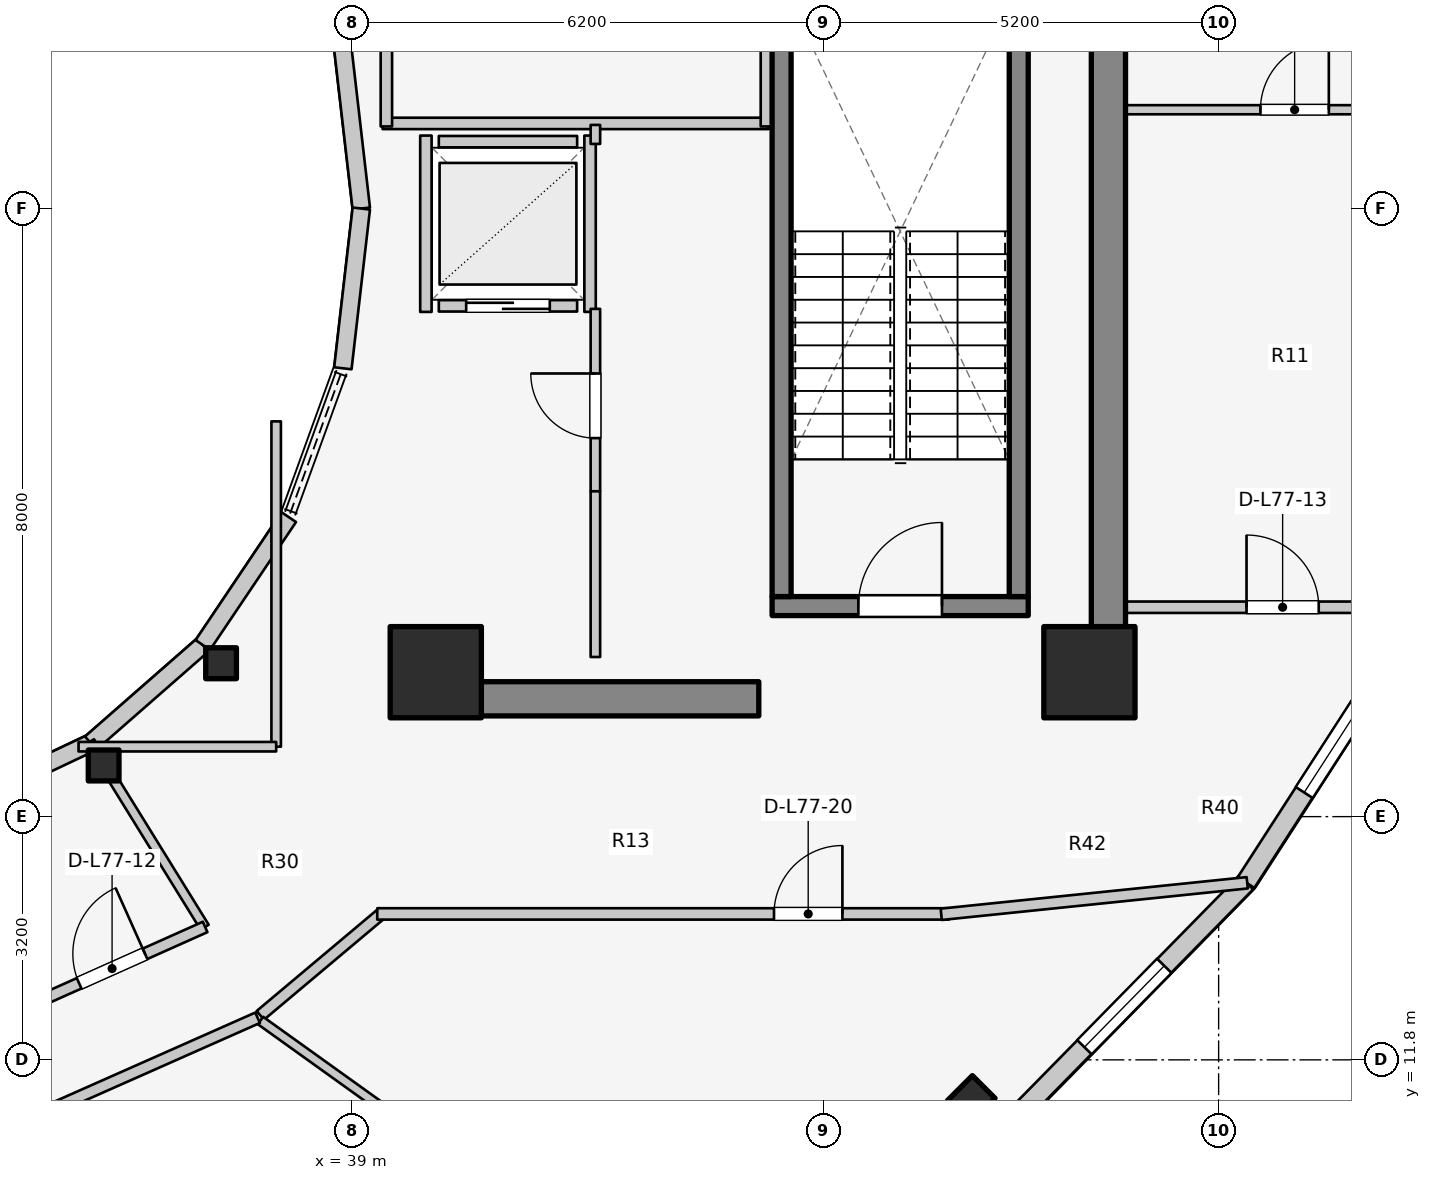
"""IFC4 building model, lengths in metres.
Left out: names, types, materials, properties, quantities, classifications, styles, units other than length and angle.
Written with IfcOpenShell. Run it as: python <this file> out.ifc"""

import sys

from ifc_helpers import new_model, si_unit, direction, frame, frame_2d, origin, origin_2d, place, context, subcontext, project, spatial, rectangle, i_section, extrude, element, fill, save


model = new_model("IFC4")
c1 = context("Model", 3, precision=1e-05, world=origin(), true_north=direction((0.0, 1.0)))
c2 = subcontext(c1, "Body", "Model", "MODEL_VIEW")
j1 = project(units=[si_unit("LENGTHUNIT", "METRE"), si_unit("PLANEANGLEUNIT", "RADIAN")], contexts=[c1])
p1 = place(None, origin())
s1 = spatial("IfcSite", under=j1, at=p1, CompositionType="ELEMENT")
p2 = place(p1, origin())
s2 = spatial("IfcBuilding", under=s1, at=p2, CompositionType="ELEMENT")
p3 = place(p2, frame((0.0, 0.0, 253.2)))
s3 = spatial("IfcBuildingStorey", under=s2, at=p3, CompositionType="ELEMENT", Elevation=253.2)
p4 = place(p3, frame((48.95, 17.05, 0.0), z_axis=(0.0, 0.0, 1.0), x_axis=(0.0, 1.0, 0.0)))
e1 = element("IfcWall", 1, at=p4, inside=s3, PredefinedType="SHEAR", context=c2, shape_type="SweptSolid", body=[
    extrude(rectangle(XDim=12.8, YDim=0.45, at=frame_2d((6.4, 0.0))), origin(), (0.0, 0.0, 1.0), 3.6),
])
p5 = place(p3, frame((39.85, 16.55, 0.0), z_axis=(0.0, 0.0, 1.0), x_axis=(1.0, 0.0, 0.0)))
e2 = element("IfcWall", 2, at=p5, inside=s3, PredefinedType="SHEAR", context=c2, shape_type="SweptSolid", body=[
    extrude(rectangle(XDim=4.5, YDim=0.45, at=frame_2d((2.25, 0.0))), origin(), (0.0, 0.0, 1.0), 3.6),
])
p6 = place(p3, frame((44.525, 17.77, 0.0), z_axis=(0.0, 0.0, 1.0), x_axis=(1.0, 0.0, 0.0)))
e3 = element("IfcWall", 3, at=p6, inside=s3, PredefinedType="SOLIDWALL", context=c2, shape_type="SweptSolid", body=[
    extrude(rectangle(XDim=3.37, YDim=0.25, at=frame_2d((1.685, 0.0))), origin(), (0.0, 0.0, 1.0), 3.6),
])
p7 = place(p6, frame((1.135, 0.0, 0.0)))
e4 = element("IfcOpeningElement", 4, at=p7, cuts=e3, PredefinedType="OPENING", context=c2, shape_type="SweptSolid", body=[
    extrude(rectangle(XDim=1.1, YDim=2.1, at=frame_2d((0.55, 1.05))), frame((0.0, 0.135, 0.0), z_axis=(0.0, -1.0, 0.0), x_axis=(1.0, 0.0, 0.0)), (0.0, 0.0, 1.0), 0.27),
])
for number, where, z_axis, x_axis in (
    (5, (44.65, 17.895, 0.0), (0.0, 0.0, 1.0), (0.0, 1.0, 0.0)),
    (6, (47.77, 17.895, 0.0), (0.0, 0.0, 1.0), (0.0, 1.0, 0.0)),
):
    element("IfcWall", number, at=place(p3, frame(where, z_axis=z_axis, x_axis=x_axis)), inside=s3, PredefinedType="SOLIDWALL", context=c2, shape_type="SweptSolid", body=[
        extrude(rectangle(XDim=7.81, YDim=0.25, at=frame_2d((3.905, 0.0))), origin(), (0.0, 0.0, 1.0), 3.6),
    ])
for number, where, z_axis, x_axis in (
    (7, (40.1, 16.9, 0.0), (0.0, 0.0, 1.0), (1.0, 0.0, 0.0)),
    (8, (48.7, 16.9, 0.0), (0.0, 0.0, 1.0), (1.0, 0.0, 0.0)),
):
    element("IfcColumn", number, at=place(p3, frame(where, z_axis=z_axis, x_axis=x_axis)), inside=s3, PredefinedType="COLUMN", context=c2, shape_type="SweptSolid", body=[
        extrude(rectangle(XDim=1.2, YDim=1.2, at=origin_2d()), origin(), (0.0, 0.0, 1.0), 3.6),
    ])
for number, where, z_axis, x_axis in (
    (9, (35.73, 15.673, 0.0), (0.0, 0.0, 1.0), (1.0, 0.0, 0.0)),
    (10, (37.275, 17.018, 0.0), (0.0, 0.0, 1.0), (1.0, 0.0, 0.0)),
):
    element("IfcColumn", number, at=place(p3, frame(where, z_axis=z_axis, x_axis=x_axis)), inside=s3, PredefinedType="COLUMN", context=c2, shape_type="SweptSolid", body=[
        extrude(i_section(OverallWidth=0.404, OverallDepth=0.407, WebThickness=0.027, FlangeThickness=0.044, FilletRadius=0.025, at=origin_2d()), origin(), (0.0, 0.0, 1.0), 3.6),
    ])
p8 = place(p3, frame((47.145, 11.279, 0.0), z_axis=(0.0, 0.0, 1.0), x_axis=(0.707106781187, -0.707106781187, 0.0)))
e11 = element("IfcColumn", 11, at=p8, inside=s3, PredefinedType="COLUMN", context=c2, shape_type="SweptSolid", body=[
    extrude(i_section(OverallWidth=0.422, OverallDepth=0.465, WebThickness=0.045, FlangeThickness=0.073, FilletRadius=0.025, at=origin_2d()), origin(), (0.0, 0.0, 1.0), 3.6),
])
p9 = place(p3, frame((39.12, 23.0, 0.0), z_axis=(0.0, 0.0, 1.0), x_axis=(-0.114711713601, 0.993398823617, 0.0)))
e12 = element("IfcWall", 12, at=p9, inside=s3, PredefinedType="STANDARD", context=c2, shape_type="SweptSolid", body=[
    extrude(rectangle(XDim=2.115, YDim=0.23, at=frame_2d((1.058, 0.0))), origin(), (0.0, 0.0, 1.0), 3.28),
])
p10 = place(p3, frame((33.843, 15.157, 0.0), z_axis=(0.0, 0.0, 1.0), x_axis=(0.904179699603, 0.427152280606, 0.0)))
e13 = element("IfcWall", 13, at=p10, inside=s3, PredefinedType="STANDARD", context=c2, shape_type="SweptSolid", body=[
    extrude(rectangle(XDim=1.899, YDim=0.23, at=frame_2d((0.95, 0.0))), origin(), (0.0, 0.0, 1.0), 2.6),
])
p11 = place(p3, frame((35.56, 15.968, 0.0), z_axis=(0.0, 0.0, 1.0), x_axis=(0.752576694707, 0.658504607869, 0.0)))
e14 = element("IfcWall", 14, at=p11, inside=s3, PredefinedType="STANDARD", context=c2, shape_type="SweptSolid", body=[
    extrude(rectangle(XDim=1.959, YDim=0.23, at=frame_2d((0.98, 0.0))), origin(), (0.0, 0.0, 1.0), 2.6),
])
p12 = place(p3, frame((37.035, 17.258, 0.0), z_axis=(0.0, 0.0, 1.0), x_axis=(0.558197800898, 0.829707909492, 0.0)))
e15 = element("IfcWall", 15, at=p12, inside=s3, PredefinedType="STANDARD", context=c2, shape_type="SweptSolid", body=[
    extrude(rectangle(XDim=2.027, YDim=0.23, at=frame_2d((1.013, 0.0))), origin(), (0.0, 0.0, 1.0), 2.6),
])
p13 = place(p3, frame((38.877, 20.898, 0.0), z_axis=(0.0, 0.0, 1.0), x_axis=(0.114711713601, 0.993398823617, 0.0)))
e16 = element("IfcWall", 16, at=p13, inside=s3, PredefinedType="STANDARD", context=c2, shape_type="SweptSolid", body=[
    extrude(rectangle(XDim=2.115, YDim=0.23, at=frame_2d((1.058, 0.0))), origin(), (0.0, 0.0, 1.0), 3.28),
])
p14 = place(p3, frame((47.558, 10.871, 0.0), z_axis=(0.0, 0.0, 1.0), x_axis=(0.700642973333, 0.713512034881, 0.0)))
e17 = element("IfcWall", 17, at=p14, inside=s3, PredefinedType="STANDARD", context=c2, shape_type="SweptSolid", body=[
    extrude(rectangle(XDim=4.572, YDim=0.26, at=frame_2d((2.286, 0.0))), origin(), (0.0, 0.0, 1.0), 3.29),
])
p15 = place(p14, frame((1.536, 0.0, 0.75)))
e18 = element("IfcOpeningElement", 18, at=p15, cuts=e17, PredefinedType="OPENING", context=c2, shape_type="SweptSolid", body=[
    extrude(rectangle(XDim=1.5, YDim=1.6, at=frame_2d((0.75, 0.8))), frame((0.0, 0.14, 0.0), z_axis=(0.0, -1.0, 0.0), x_axis=(1.0, 0.0, 0.0)), (0.0, 0.0, 1.0), 0.28),
])
p16 = place(p3, frame((50.761, 14.133, 0.0), z_axis=(0.0, 0.0, 1.0), x_axis=(0.542641766008, 0.839964233634, 0.0)))
e19 = element("IfcWall", 19, at=p16, inside=s3, PredefinedType="STANDARD", context=c2, shape_type="SweptSolid", body=[
    extrude(rectangle(XDim=4.319, YDim=0.26, at=frame_2d((2.16, 0.0))), origin(), (0.0, 0.0, 1.0), 3.29),
])
p17 = place(p16, frame((1.41, 0.0, 0.75)))
e20 = element("IfcOpeningElement", 20, at=p17, cuts=e19, PredefinedType="OPENING", context=c2, shape_type="SweptSolid", body=[
    extrude(rectangle(XDim=1.5, YDim=1.6, at=frame_2d((0.75, 0.8))), frame((0.0, 0.14, 0.0), z_axis=(0.0, -1.0, 0.0), x_axis=(1.0, 0.0, 0.0)), (0.0, 0.0, 1.0), 0.28),
])
p18 = place(p3, frame((40.14, 21.72, 0.0), z_axis=(0.0, 0.0, 1.0), x_axis=(1.0, 0.0, 0.0)))
e21 = element("IfcWall", 21, at=p18, inside=s3, PredefinedType="SOLIDWALL", context=c2, shape_type="SweptSolid", body=[
    extrude(rectangle(XDim=1.82, YDim=0.15, at=frame_2d((0.91, 0.0))), origin(), (0.0, 0.0, 1.0), 2.62),
])
p19 = place(p18, frame((0.36, 0.0, 0.0)))
e22 = element("IfcOpeningElement", 22, at=p19, cuts=e21, PredefinedType="OPENING", context=c2, shape_type="SweptSolid", body=[
    extrude(rectangle(XDim=1.1, YDim=2.1, at=frame_2d((0.55, 1.05))), frame((0.0, 0.085, 0.0), z_axis=(0.0, -1.0, 0.0), x_axis=(1.0, 0.0, 0.0)), (0.0, 0.0, 1.0), 0.17),
])
p20 = place(p3, frame((40.14, 23.88, 0.0), z_axis=(0.0, 0.0, 1.0), x_axis=(1.0, 0.0, 0.0)))
e23 = element("IfcWall", 23, at=p20, inside=s3, PredefinedType="SOLIDWALL", context=c2, shape_type="SweptSolid", body=[
    extrude(rectangle(XDim=1.82, YDim=0.15, at=frame_2d((0.91, 0.0))), origin(), (0.0, 0.0, 1.0), 2.62),
])
p21 = place(p3, frame((39.97, 21.64, 0.0), z_axis=(0.0, 0.0, 1.0), x_axis=(0.0, 1.0, 0.0)))
e24 = element("IfcWall", 24, at=p21, inside=s3, PredefinedType="SOLIDWALL", context=c2, shape_type="SweptSolid", body=[
    extrude(rectangle(XDim=2.32, YDim=0.15, at=frame_2d((1.16, 0.0))), origin(), (0.0, 0.0, 1.0), 2.62),
])
p22 = place(p3, frame((42.13, 21.64, 0.0), z_axis=(0.0, 0.0, 1.0), x_axis=(0.0, 1.0, 0.0)))
e25 = element("IfcWall", 25, at=p22, inside=s3, PredefinedType="SOLIDWALL", context=c2, shape_type="SweptSolid", body=[
    extrude(rectangle(XDim=2.32, YDim=0.15, at=frame_2d((1.16, 0.0))), origin(), (0.0, 0.0, 1.0), 3.295),
])
p23 = place(p3, frame((39.4, 24.12, 0.0), z_axis=(0.0, 0.0, 1.0), x_axis=(1.0, 0.0, 0.0)))
e26 = element("IfcWall", 26, at=p23, inside=s3, PredefinedType="PARTITIONING", context=c2, shape_type="SweptSolid", body=[
    extrude(rectangle(XDim=5.08, YDim=0.15, at=frame_2d((2.54, 0.0))), origin(), (0.0, 0.0, 1.0), 2.62),
])
p24 = place(p3, frame((44.45, 24.08, 0.0), z_axis=(0.0, 0.0, 1.0), x_axis=(0.0, 1.0, 0.0)))
e27 = element("IfcWall", 27, at=p24, inside=s3, PredefinedType="PARTITIONING", context=c2, shape_type="SweptSolid", body=[
    extrude(rectangle(XDim=3.2, YDim=0.15, at=frame_2d((1.6, 0.0))), origin(), (0.0, 0.0, 1.0), 3.295),
])
p25 = place(p3, frame((39.45, 24.08, 0.0), z_axis=(0.0, 0.0, 1.0), x_axis=(0.0, 1.0, 0.0)))
e28 = element("IfcWall", 28, at=p25, inside=s3, PredefinedType="PARTITIONING", context=c2, shape_type="SweptSolid", body=[
    extrude(rectangle(XDim=3.4, YDim=0.15, at=frame_2d((1.7, 0.0))), origin(), (0.0, 0.0, 1.0), 3.295),
])
p26 = place(p25, frame((2.02, 0.0, 0.0)))
e29 = element("IfcOpeningElement", 29, at=p26, cuts=e28, PredefinedType="OPENING", context=c2, shape_type="SweptSolid", body=[
    extrude(rectangle(XDim=1.1, YDim=2.1, at=frame_2d((0.55, 1.05))), frame((0.0, 0.085, 0.0), z_axis=(0.0, -1.0, 0.0), x_axis=(1.0, 0.0, 0.0)), (0.0, 0.0, 1.0), 0.17),
])
p27 = place(p3, frame((42.2, 19.28, 0.0), z_axis=(0.0, 0.0, 1.0), x_axis=(0.0, 1.0, 0.0)))
e30 = element("IfcWall", 30, at=p27, inside=s3, PredefinedType="PARTITIONING", context=c2, shape_type="SweptSolid", body=[
    extrude(rectangle(XDim=2.4, YDim=0.125, at=frame_2d((1.2, 0.0))), origin(), (0.0, 0.0, 1.0), 3.295),
])
p28 = place(p27, frame((0.7, 0.0, 0.0)))
e31 = element("IfcOpeningElement", 31, at=p28, cuts=e30, PredefinedType="OPENING", context=c2, shape_type="SweptSolid", body=[
    extrude(rectangle(XDim=0.85, YDim=2.05, at=frame_2d((0.425, 1.025))), frame((0.0, 0.073, 0.0), z_axis=(0.0, -1.0, 0.0), x_axis=(1.0, 0.0, 0.0)), (0.0, 0.0, 1.0), 0.145),
])
p29 = place(p3, frame((42.2, 23.85, 0.0), z_axis=(0.0, 0.0, 1.0), x_axis=(0.0, 1.0, 0.0)))
e32 = element("IfcWall", 32, at=p29, inside=s3, PredefinedType="PARTITIONING", context=c2, shape_type="SweptSolid", body=[
    extrude(rectangle(XDim=0.25, YDim=0.125, at=frame_2d((0.125, 0.0))), origin(), (0.0, 0.0, 1.0), 3.295),
])
p30 = place(p3, frame((42.2, 17.1, 0.0), z_axis=(0.0, 0.0, 1.0), x_axis=(0.0, 1.0, 0.0)))
e33 = element("IfcWall", 33, at=p30, inside=s3, PredefinedType="PARTITIONING", context=c2, shape_type="SweptSolid", body=[
    extrude(rectangle(XDim=2.18, YDim=0.125, at=frame_2d((1.09, 0.0))), origin(), (0.0, 0.0, 1.0), 3.295),
])
p31 = place(p3, frame((35.55, 15.985, 0.0), z_axis=(0.0, 0.0, 1.0), x_axis=(0.52592395012, -0.850531597702, 0.0)))
e34 = element("IfcWall", 34, at=p31, inside=s3, PredefinedType="PARTITIONING", context=c2, shape_type="SweptSolid", body=[
    extrude(rectangle(XDim=2.869, YDim=0.125, at=frame_2d((1.435, 0.0))), origin(), (0.0, 0.0, 1.0), 2.672),
])
p32 = place(p3, frame((34.617, 12.454, 0.0), z_axis=(0.0, 0.0, 1.0), x_axis=(0.912859324183, 0.408274239027, 0.0)))
e35 = element("IfcWall", 35, at=p32, inside=s3, PredefinedType="PARTITIONING", context=c2, shape_type="SweptSolid", body=[
    extrude(rectangle(XDim=2.682, YDim=0.15, at=frame_2d((1.341, 0.0))), origin(), (0.0, 0.0, 1.0), 2.816),
])
p33 = place(p32, frame((0.866, 0.0, 0.0)))
e36 = element("IfcOpeningElement", 36, at=p33, cuts=e35, PredefinedType="OPENING", context=c2, shape_type="SweptSolid", body=[
    extrude(rectangle(XDim=0.95, YDim=2.1, at=frame_2d((0.475, 1.05))), frame((0.0, 0.085, 0.0), z_axis=(0.0, -1.0, 0.0), x_axis=(1.0, 0.0, 0.0)), (0.0, 0.0, 1.0), 0.17),
])
p34 = place(p3, frame((38.0, 15.92, 0.0), z_axis=(0.0, 0.0, 1.0), x_axis=(0.0, 1.0, 0.0)))
e37 = element("IfcWall", 37, at=p34, inside=s3, PredefinedType="PARTITIONING", context=c2, shape_type="SweptSolid", body=[
    extrude(rectangle(XDim=4.28, YDim=0.125, at=frame_2d((2.14, 0.0))), origin(), (0.0, 0.0, 1.0), 2.672),
])
p35 = place(p3, frame((35.4, 15.92, 0.0), z_axis=(0.0, 0.0, 1.0), x_axis=(1.0, 0.0, 0.0)))
e38 = element("IfcWall", 38, at=p35, inside=s3, PredefinedType="PARTITIONING", context=c2, shape_type="SweptSolid", body=[
    extrude(rectangle(XDim=2.6, YDim=0.125, at=frame_2d((1.3, 0.0))), origin(), (0.0, 0.0, 1.0), 2.672),
])
p36 = place(p3, frame((48.95, 17.755, 0.0), z_axis=(0.0, 0.0, 1.0), x_axis=(1.0, 0.0, 0.0)))
e39 = element("IfcWall", 39, at=p36, inside=s3, PredefinedType="PARTITIONING", context=c2, shape_type="SweptSolid", body=[
    extrude(rectangle(XDim=4.175, YDim=0.15, at=frame_2d((2.087, 0.0))), origin(), (0.0, 0.0, 1.0), 3.295),
])
p37 = place(p36, frame((1.817, 0.0, 0.0)))
e40 = element("IfcOpeningElement", 40, at=p37, cuts=e39, PredefinedType="OPENING", context=c2, shape_type="SweptSolid", body=[
    extrude(rectangle(XDim=0.95, YDim=2.1, at=frame_2d((0.475, 1.05))), frame((0.0, 0.085, 0.0), z_axis=(0.0, -1.0, 0.0), x_axis=(1.0, 0.0, 0.0)), (0.0, 0.0, 1.0), 0.17),
])
p38 = place(p3, frame((48.95, 24.3, 0.0), z_axis=(0.0, 0.0, 1.0), x_axis=(1.0, 0.0, 0.0)))
e41 = element("IfcWall", 41, at=p38, inside=s3, PredefinedType="MOVABLE", context=c2, shape_type="SweptSolid", body=[
    extrude(rectangle(XDim=4.683, YDim=0.12, at=frame_2d((2.341, 0.0))), origin(), (0.0, 0.0, 1.0), 3.295),
])
p39 = place(p38, frame((2.0, 0.0, 0.0)))
e42 = element("IfcOpeningElement", 42, at=p39, cuts=e41, PredefinedType="OPENING", context=c2, shape_type="SweptSolid", body=[
    extrude(rectangle(XDim=0.9, YDim=2.1, at=frame_2d((0.45, 1.05))), frame((0.0, 0.07, 0.0), z_axis=(0.0, -1.0, 0.0), x_axis=(1.0, 0.0, 0.0)), (0.0, 0.0, 1.0), 0.14),
])
p40 = place(p3, frame((37.791, 12.385, 0.0), z_axis=(0.0, 0.0, 1.0), x_axis=(0.765677451641, 0.643224719711, 0.0)))
e43 = element("IfcWall", 43, at=p40, inside=s3, PredefinedType="PARTITIONING", context=c2, shape_type="SweptSolid", body=[
    extrude(rectangle(XDim=2.105, YDim=0.15, at=frame_2d((1.053, 0.0))), origin(), (0.0, 0.0, 1.0), 2.816),
])
p41 = place(p3, frame((39.33, 13.72, 0.0), z_axis=(0.0, 0.0, 1.0), x_axis=(1.0, 0.0, 0.0)))
e44 = element("IfcWall", 44, at=p41, inside=s3, PredefinedType="PARTITIONING", context=c2, shape_type="SweptSolid", body=[
    extrude(rectangle(XDim=7.52, YDim=0.15, at=frame_2d((3.76, 0.0))), origin(), (0.0, 0.0, 1.0), 2.816),
])
p42 = place(p41, frame((5.22, 0.0, 0.0)))
e45 = element("IfcOpeningElement", 45, at=p42, cuts=e44, PredefinedType="OPENING", context=c2, shape_type="SweptSolid", body=[
    extrude(rectangle(XDim=0.9, YDim=2.1, at=frame_2d((0.45, 1.05))), frame((0.0, 0.085, 0.0), z_axis=(0.0, -1.0, 0.0), x_axis=(1.0, 0.0, 0.0)), (0.0, 0.0, 1.0), 0.17),
])
p43 = place(p3, frame((46.75, 13.715, 0.0), z_axis=(0.0, 0.0, 1.0), x_axis=(0.994734711466, 0.102483431859, 0.0)))
e46 = element("IfcWall", 46, at=p43, inside=s3, PredefinedType="PARTITIONING", context=c2, shape_type="SweptSolid", body=[
    extrude(rectangle(XDim=4.047, YDim=0.15, at=frame_2d((2.024, 0.0))), origin(), (0.0, 0.0, 1.0), 2.66),
])
p44 = place(p3, frame((37.794, 12.318, 0.0), z_axis=(0.0, 0.0, 1.0), x_axis=(0.812763742602, -0.582593424879, 0.0)))
e47 = element("IfcWall", 47, at=p44, inside=s3, PredefinedType="MOVABLE", context=c2, shape_type="SweptSolid", body=[
    extrude(rectangle(XDim=6.966, YDim=0.12, at=frame_2d((3.483, 0.0))), origin(), (0.0, 0.0, 1.0), 2.66),
])
p45 = place(p3, frame((34.974, 11.121, 0.0), z_axis=(0.0, 0.0, 1.0), x_axis=(0.914181699255, 0.405304602425, 0.0)))
e48 = element("IfcWall", 48, at=p45, inside=s3, PredefinedType="PARTITIONING", context=c2, shape_type="SweptSolid", body=[
    extrude(rectangle(XDim=3.043, YDim=0.15, at=frame_2d((1.521, 0.0))), origin(), (0.0, 0.0, 1.0), 2.816),
])
p46 = place(p15, origin())
e49 = element("IfcWindow", 49, at=p46, inside=s3, PartitioningType="SINGLE_PANEL", PredefinedType="WINDOW", context=c2, shape_type="SweptSolid", body=[
    extrude(rectangle(XDim=1.5, YDim=1.6, at=frame_2d((0.75, 0.8))), frame((0.0, 0.03, 0.0), z_axis=(0.0, -1.0, 0.0), x_axis=(1.0, 0.0, 0.0)), (0.0, 0.0, 1.0), 0.06),
])
fill(e18, e49)
p47 = place(p17, origin())
e50 = element("IfcWindow", 50, at=p47, inside=s3, PartitioningType="SINGLE_PANEL", PredefinedType="WINDOW", context=c2, shape_type="SweptSolid", body=[
    extrude(rectangle(XDim=1.5, YDim=1.6, at=frame_2d((0.75, 0.8))), frame((0.0, 0.03, 0.0), z_axis=(0.0, -1.0, 0.0), x_axis=(1.0, 0.0, 0.0)), (0.0, 0.0, 1.0), 0.06),
])
fill(e20, e50)
p48 = place(p7, origin())
e51 = element("IfcDoor", 51, at=p48, inside=s3, OperationType="SINGLE_SWING_RIGHT", PredefinedType="DOOR", context=c2, shape_type="SweptSolid", body=[
    extrude(rectangle(XDim=1.1, YDim=2.1, at=frame_2d((0.55, 1.05))), frame((0.0, 0.025, 0.0), z_axis=(0.0, -1.0, 0.0), x_axis=(1.0, 0.0, 0.0)), (0.0, 0.0, 1.0), 0.05),
])
fill(e4, e51)
p49 = place(p19, origin())
e52 = element("IfcDoor", 52, at=p49, inside=s3, OperationType="DOUBLE_DOOR_SLIDING", PredefinedType="DOOR", context=c2, shape_type="SweptSolid", body=[
    extrude(rectangle(XDim=1.1, YDim=2.1, at=frame_2d((0.55, 1.05))), frame((0.0, 0.025, 0.0), z_axis=(0.0, -1.0, 0.0), x_axis=(1.0, 0.0, 0.0)), (0.0, 0.0, 1.0), 0.05),
])
fill(e22, e52)
p50 = place(p28, origin())
e53 = element("IfcDoor", 53, at=p50, inside=s3, OperationType="SINGLE_SWING_RIGHT", PredefinedType="DOOR", context=c2, shape_type="SweptSolid", body=[
    extrude(rectangle(XDim=0.85, YDim=2.05, at=frame_2d((0.425, 1.025))), frame((0.0, 0.025, 0.0), z_axis=(0.0, -1.0, 0.0), x_axis=(1.0, 0.0, 0.0)), (0.0, 0.0, 1.0), 0.05),
])
fill(e31, e53)
p51 = place(p33, origin())
e54 = element("IfcDoor", 54, at=p51, inside=s3, OperationType="SINGLE_SWING_RIGHT", PredefinedType="DOOR", context=c2, shape_type="SweptSolid", body=[
    extrude(rectangle(XDim=0.95, YDim=2.1, at=frame_2d((0.475, 1.05))), frame((0.0, 0.025, 0.0), z_axis=(0.0, -1.0, 0.0), x_axis=(1.0, 0.0, 0.0)), (0.0, 0.0, 1.0), 0.05),
])
fill(e36, e54)
p52 = place(p37, origin())
e55 = element("IfcDoor", 55, at=p52, inside=s3, OperationType="SINGLE_SWING_LEFT", PredefinedType="DOOR", context=c2, shape_type="SweptSolid", body=[
    extrude(rectangle(XDim=0.95, YDim=2.1, at=frame_2d((0.475, 1.05))), frame((0.0, 0.025, 0.0), z_axis=(0.0, -1.0, 0.0), x_axis=(1.0, 0.0, 0.0)), (0.0, 0.0, 1.0), 0.05),
])
fill(e40, e55)
p53 = place(p39, origin())
e56 = element("IfcDoor", 56, at=p53, inside=s3, OperationType="SINGLE_SWING_RIGHT", PredefinedType="DOOR", context=c2, shape_type="SweptSolid", body=[
    extrude(rectangle(XDim=0.9, YDim=2.1, at=frame_2d((0.45, 1.05))), frame((0.0, 0.025, 0.0), z_axis=(0.0, -1.0, 0.0), x_axis=(1.0, 0.0, 0.0)), (0.0, 0.0, 1.0), 0.05),
])
fill(e42, e56)
p54 = place(p42, origin())
e57 = element("IfcDoor", 57, at=p54, inside=s3, OperationType="SINGLE_SWING_RIGHT", PredefinedType="DOOR", context=c2, shape_type="SweptSolid", body=[
    extrude(rectangle(XDim=0.9, YDim=2.1, at=frame_2d((0.45, 1.05))), frame((0.0, 0.025, 0.0), z_axis=(0.0, -1.0, 0.0), x_axis=(1.0, 0.0, 0.0)), (0.0, 0.0, 1.0), 0.05),
])
fill(e45, e57)
save(model, sys.argv[1])
